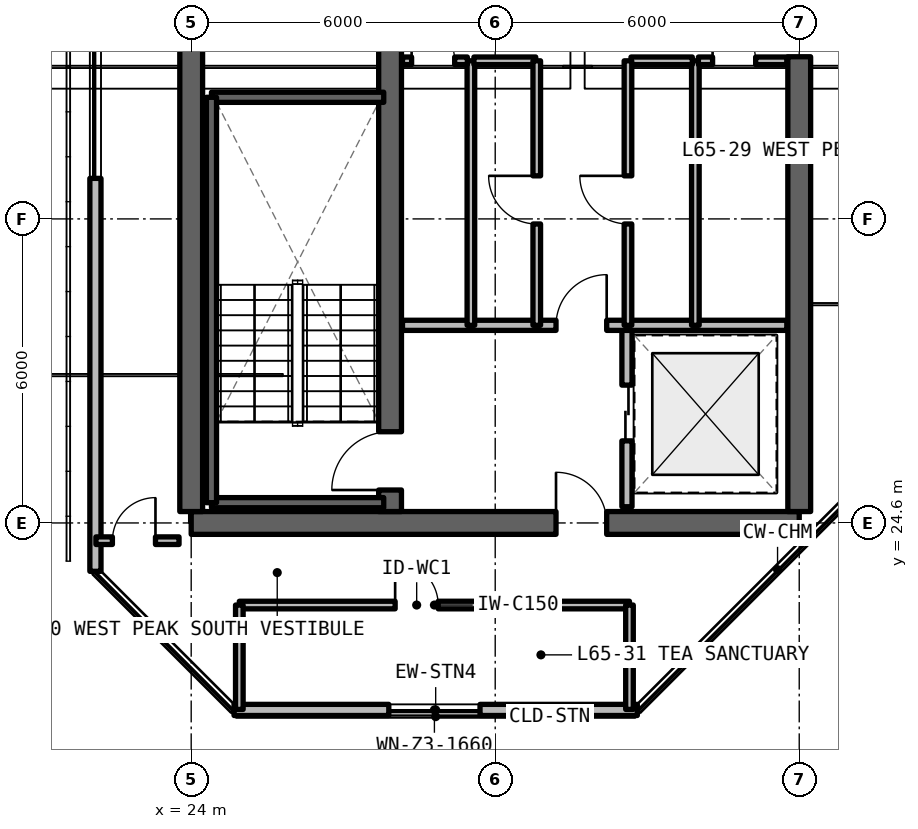
"""IFC4 building model, lengths in metres.
Left out: names, types, materials, properties, quantities, classifications, styles, units other than length and angle.
Written with IfcOpenShell. Run it as: python <this file> out.ifc"""

import sys

from ifc_helpers import new_model, si_unit, direction, frame, frame_2d, origin, place, context, subcontext, project, spatial, rectangle, extrude, element, fill, save


model = new_model("IFC4")
c1 = context("Model", 3, precision=1e-05, world=origin(), true_north=direction((0.0, 1.0)))
c2 = subcontext(c1, "Body", "Model", "MODEL_VIEW")
j1 = project(units=[si_unit("LENGTHUNIT", "METRE"), si_unit("PLANEANGLEUNIT", "RADIAN")], contexts=[c1])
p1 = place(None, origin())
s1 = spatial("IfcSite", under=j1, at=p1, CompositionType="ELEMENT")
p2 = place(p1, origin())
s2 = spatial("IfcBuilding", under=s1, at=p2, CompositionType="ELEMENT")
p3 = place(p2, frame((0.0, 0.0, 232.65)))
s3 = spatial("IfcBuildingStorey", under=s2, at=p3, CompositionType="ELEMENT", Elevation=232.65)
p4 = place(p3, frame((24.0, 24.6, 0.0), z_axis=(0.0, 0.0, 1.0), x_axis=(1.0, 0.0, 0.0)))
e1 = element("IfcWall", 1, at=p4, inside=s3, PredefinedType="SHEAR", context=c2, shape_type="SweptSolid", body=[
    extrude(rectangle(XDim=12.0, YDim=0.45, at=frame_2d((6.0, 0.0))), origin(), (0.0, 0.0, 1.0), 3.3),
])
p5 = place(p4, frame((7.2, 0.0, 0.0)))
e2 = element("IfcOpeningElement", 2, at=p5, cuts=e1, PredefinedType="OPENING", context=c2, shape_type="SweptSolid", body=[
    extrude(rectangle(XDim=1.0, YDim=2.15, at=frame_2d((0.5, 1.075))), frame((0.0, 0.235, 0.0), z_axis=(0.0, -1.0, 0.0), x_axis=(1.0, 0.0, 0.0)), (0.0, 0.0, 1.0), 0.47),
])
p6 = place(p3, frame((24.0, 24.825, 0.0), z_axis=(0.0, 0.0, 1.0), x_axis=(0.0, 1.0, 0.0)))
e3 = element("IfcWall", 3, at=p6, inside=s3, PredefinedType="SHEAR", context=c2, shape_type="SweptSolid", body=[
    extrude(rectangle(XDim=17.55, YDim=0.45, at=frame_2d((8.775, 0.0))), origin(), (0.0, 0.0, 1.0), 3.3),
])
p7 = place(p3, frame((36.0, 24.825, 0.0), z_axis=(0.0, 0.0, 1.0), x_axis=(0.0, 1.0, 0.0)))
e4 = element("IfcWall", 4, at=p7, inside=s3, PredefinedType="SHEAR", context=c2, shape_type="SweptSolid", body=[
    extrude(rectangle(XDim=8.975, YDim=0.45, at=frame_2d((4.488, 0.0))), origin(), (0.0, 0.0, 1.0), 3.3),
])
p8 = place(p3, frame((27.925, 24.825, 0.0), z_axis=(0.0, 0.0, 1.0), x_axis=(0.0, 1.0, 0.0)))
e5 = element("IfcWall", 5, at=p8, inside=s3, PredefinedType="SHEAR", context=c2, shape_type="SweptSolid", body=[
    extrude(rectangle(XDim=17.55, YDim=0.45, at=frame_2d((8.775, 0.0))), origin(), (0.0, 0.0, 1.0), 3.3),
])
p9 = place(p8, frame((0.425, 0.0, 0.0)))
e6 = element("IfcOpeningElement", 6, at=p9, cuts=e5, PredefinedType="OPENING", context=c2, shape_type="SweptSolid", body=[
    extrude(rectangle(XDim=1.15, YDim=2.15, at=frame_2d((0.575, 1.075))), frame((0.0, 0.235, 0.0), z_axis=(0.0, -1.0, 0.0), x_axis=(1.0, 0.0, 0.0)), (0.0, 0.0, 1.0), 0.47),
])
p10 = place(p8, frame((9.625, 0.0, 0.0)))
e7 = element("IfcOpeningElement", 7, at=p10, cuts=e5, PredefinedType="OPENING", context=c2, shape_type="SweptSolid", body=[
    extrude(rectangle(XDim=1.15, YDim=2.15, at=frame_2d((0.575, 1.075))), frame((0.0, 0.235, 0.0), z_axis=(0.0, -1.0, 0.0), x_axis=(1.0, 0.0, 0.0)), (0.0, 0.0, 1.0), 0.47),
])
p11 = place(p3, frame((24.846, 20.91, 0.0), z_axis=(0.0, 0.0, 1.0), x_axis=(1.0, 0.0, 0.0)))
e8 = element("IfcWall", 8, at=p11, inside=s3, PredefinedType="SOLIDWALL", context=c2, shape_type="SweptSolid", body=[
    extrude(rectangle(XDim=7.959, YDim=0.22, at=frame_2d((3.979, 0.0))), origin(), (0.0, 0.0, 1.0), 3.08),
])
p12 = place(p11, frame((3.054, 0.0, 0.78)))
e9 = element("IfcOpeningElement", 9, at=p12, cuts=e8, PredefinedType="OPENING", context=c2, shape_type="SweptSolid", body=[
    extrude(rectangle(XDim=1.8, YDim=1.66, at=frame_2d((0.9, 0.83))), frame((0.0, 0.12, 0.0), z_axis=(0.0, -1.0, 0.0), x_axis=(1.0, 0.0, 0.0)), (0.0, 0.0, 1.0), 0.24),
])
p13 = place(p3, frame((22.11, 43.554, 0.0), z_axis=(0.0, 0.0, 1.0), x_axis=(0.0, -1.0, 0.0)))
e10 = element("IfcWall", 10, at=p13, inside=s3, PredefinedType="SOLIDWALL", context=c2, shape_type="SweptSolid", body=[
    extrude(rectangle(XDim=19.909, YDim=0.22, at=frame_2d((9.955, 0.0))), origin(), (0.0, 0.0, 1.0), 3.08),
])
p14 = place(p13, frame((7.754, 0.0, 0.78)))
e11 = element("IfcOpeningElement", 11, at=p14, cuts=e10, PredefinedType="OPENING", context=c2, shape_type="SweptSolid", body=[
    extrude(rectangle(XDim=4.4, YDim=1.66, at=frame_2d((2.2, 0.83))), frame((0.0, 0.12, 0.0), z_axis=(0.0, -1.0, 0.0), x_axis=(1.0, 0.0, 0.0)), (0.0, 0.0, 1.0), 0.24),
])
p15 = place(p3, frame((32.6, 24.92, 0.0), z_axis=(0.0, 0.0, 1.0), x_axis=(0.0, 1.0, 0.0)))
e12 = element("IfcWall", 12, at=p15, inside=s3, PredefinedType="SOLIDWALL", context=c2, shape_type="SweptSolid", body=[
    extrude(rectangle(XDim=3.58, YDim=0.2, at=frame_2d((1.79, 0.0))), origin(), (0.0, 0.0, 1.0), 2.35),
])
p16 = place(p15, frame((1.3, 0.0, 0.0)))
e13 = element("IfcOpeningElement", 13, at=p16, cuts=e12, PredefinedType="OPENING", context=c2, shape_type="SweptSolid", body=[
    extrude(rectangle(XDim=1.1, YDim=2.2, at=frame_2d((0.55, 1.1))), frame((0.0, 0.11, 0.0), z_axis=(0.0, -1.0, 0.0), x_axis=(1.0, 0.0, 0.0)), (0.0, 0.0, 1.0), 0.22),
])
p17 = place(p3, frame((28.17, 28.5, 0.0), z_axis=(0.0, 0.0, 1.0), x_axis=(1.0, 0.0, 0.0)))
e14 = element("IfcWall", 14, at=p17, inside=s3, PredefinedType="SOLIDWALL", context=c2, shape_type="SweptSolid", body=[
    extrude(rectangle(XDim=7.585, YDim=0.2, at=frame_2d((3.792, 0.0))), origin(), (0.0, 0.0, 1.0), 2.35),
])
p18 = place(p17, frame((3.03, 0.0, 0.0)))
e15 = element("IfcOpeningElement", 15, at=p18, cuts=e14, PredefinedType="OPENING", context=c2, shape_type="SweptSolid", body=[
    extrude(rectangle(XDim=1.0, YDim=2.15, at=frame_2d((0.5, 1.075))), frame((0.0, 0.11, 0.0), z_axis=(0.0, -1.0, 0.0), x_axis=(1.0, 0.0, 0.0)), (0.0, 0.0, 1.0), 0.22),
])
p19 = place(p3, frame((29.52, 28.5, 0.0), z_axis=(0.0, 0.0, 1.0), x_axis=(0.0, 1.0, 0.0)))
e16 = element("IfcWall", 16, at=p19, inside=s3, PredefinedType="SOLIDWALL", context=c2, shape_type="SweptSolid", body=[
    extrude(rectangle(XDim=5.22, YDim=0.15, at=frame_2d((2.61, 0.0))), origin(), (0.0, 0.0, 1.0), 2.35),
])
p20 = place(p3, frame((28.17, 33.72, 0.0), z_axis=(0.0, 0.0, 1.0), x_axis=(1.0, 0.0, 0.0)))
e17 = element("IfcWall", 17, at=p20, inside=s3, PredefinedType="SOLIDWALL", context=c2, shape_type="SweptSolid", body=[
    extrude(rectangle(XDim=1.28, YDim=0.15, at=frame_2d((0.64, 0.0))), origin(), (0.0, 0.0, 1.0), 2.35),
])
p21 = place(p20, frame((0.18, 0.0, 0.0)))
e18 = element("IfcOpeningElement", 18, at=p21, cuts=e17, PredefinedType="OPENING", context=c2, shape_type="SweptSolid", body=[
    extrude(rectangle(XDim=0.85, YDim=2.1, at=frame_2d((0.425, 1.05))), frame((0.0, 0.085, 0.0), z_axis=(0.0, -1.0, 0.0), x_axis=(1.0, 0.0, 0.0)), (0.0, 0.0, 1.0), 0.17),
])
p22 = place(p3, frame((29.58, 33.72, 0.0), z_axis=(0.0, 0.0, 1.0), x_axis=(1.0, 0.0, 0.0)))
e19 = element("IfcWall", 19, at=p22, inside=s3, PredefinedType="SOLIDWALL", context=c2, shape_type="SweptSolid", body=[
    extrude(rectangle(XDim=1.22, YDim=0.15, at=frame_2d((0.61, 0.0))), origin(), (0.0, 0.0, 1.0), 2.35),
])
p23 = place(p3, frame((30.82, 28.5, 0.0), z_axis=(0.0, 0.0, 1.0), x_axis=(0.0, 1.0, 0.0)))
e20 = element("IfcWall", 20, at=p23, inside=s3, PredefinedType="SOLIDWALL", context=c2, shape_type="SweptSolid", body=[
    extrude(rectangle(XDim=5.22, YDim=0.15, at=frame_2d((2.61, 0.0))), origin(), (0.0, 0.0, 1.0), 2.35),
])
p24 = place(p23, frame((2.0, 0.0, 0.0)))
e21 = element("IfcOpeningElement", 21, at=p24, cuts=e20, PredefinedType="OPENING", context=c2, shape_type="SweptSolid", body=[
    extrude(rectangle(XDim=0.95, YDim=2.15, at=frame_2d((0.475, 1.075))), frame((0.0, 0.085, 0.0), z_axis=(0.0, -1.0, 0.0), x_axis=(1.0, 0.0, 0.0)), (0.0, 0.0, 1.0), 0.17),
])
p25 = place(p3, frame((33.95, 28.5, 0.0), z_axis=(0.0, 0.0, 1.0), x_axis=(0.0, 1.0, 0.0)))
e22 = element("IfcWall", 22, at=p25, inside=s3, PredefinedType="SOLIDWALL", context=c2, shape_type="SweptSolid", body=[
    extrude(rectangle(XDim=5.22, YDim=0.15, at=frame_2d((2.61, 0.0))), origin(), (0.0, 0.0, 1.0), 2.35),
])
p26 = place(p3, frame((32.68, 33.72, 0.0), z_axis=(0.0, 0.0, 1.0), x_axis=(1.0, 0.0, 0.0)))
e23 = element("IfcWall", 23, at=p26, inside=s3, PredefinedType="SOLIDWALL", context=c2, shape_type="SweptSolid", body=[
    extrude(rectangle(XDim=1.21, YDim=0.15, at=frame_2d((0.605, 0.0))), origin(), (0.0, 0.0, 1.0), 2.35),
])
p27 = place(p3, frame((34.01, 33.72, 0.0), z_axis=(0.0, 0.0, 1.0), x_axis=(1.0, 0.0, 0.0)))
e24 = element("IfcWall", 24, at=p27, inside=s3, PredefinedType="SOLIDWALL", context=c2, shape_type="SweptSolid", body=[
    extrude(rectangle(XDim=1.745, YDim=0.15, at=frame_2d((0.873, 0.0))), origin(), (0.0, 0.0, 1.0), 2.35),
])
p28 = place(p27, frame((0.28, 0.0, 0.0)))
e25 = element("IfcOpeningElement", 25, at=p28, cuts=e24, PredefinedType="OPENING", context=c2, shape_type="SweptSolid", body=[
    extrude(rectangle(XDim=0.85, YDim=2.1, at=frame_2d((0.425, 1.05))), frame((0.0, 0.085, 0.0), z_axis=(0.0, -1.0, 0.0), x_axis=(1.0, 0.0, 0.0)), (0.0, 0.0, 1.0), 0.17),
])
p29 = place(p3, frame((32.62, 28.5, 0.0), z_axis=(0.0, 0.0, 1.0), x_axis=(0.0, 1.0, 0.0)))
e26 = element("IfcWall", 26, at=p29, inside=s3, PredefinedType="SOLIDWALL", context=c2, shape_type="SweptSolid", body=[
    extrude(rectangle(XDim=5.22, YDim=0.15, at=frame_2d((2.61, 0.0))), origin(), (0.0, 0.0, 1.0), 2.35),
])
p30 = place(p29, frame((2.0, 0.0, 0.0)))
e27 = element("IfcOpeningElement", 27, at=p30, cuts=e26, PredefinedType="OPENING", context=c2, shape_type="SweptSolid", body=[
    extrude(rectangle(XDim=0.95, YDim=2.15, at=frame_2d((0.475, 1.075))), frame((0.0, 0.085, 0.0), z_axis=(0.0, -1.0, 0.0), x_axis=(1.0, 0.0, 0.0)), (0.0, 0.0, 1.0), 0.17),
])
p31 = place(p3, frame((24.95, 22.98, 0.0), z_axis=(0.0, 0.0, 1.0), x_axis=(1.0, 0.0, 0.0)))
e28 = element("IfcWall", 28, at=p31, inside=s3, PredefinedType="SOLIDWALL", context=c2, shape_type="SweptSolid", body=[
    extrude(rectangle(XDim=7.7, YDim=0.15, at=frame_2d((3.85, 0.0))), origin(), (0.0, 0.0, 1.0), 2.35),
])
p32 = place(p31, frame((3.075, 0.0, 0.0)))
e29 = element("IfcOpeningElement", 29, at=p32, cuts=e28, PredefinedType="OPENING", context=c2, shape_type="SweptSolid", body=[
    extrude(rectangle(XDim=0.85, YDim=2.1, at=frame_2d((0.425, 1.05))), frame((0.0, 0.085, 0.0), z_axis=(0.0, -1.0, 0.0), x_axis=(1.0, 0.0, 0.0)), (0.0, 0.0, 1.0), 0.17),
])
for number, where, z_axis, x_axis in (
    (30, (24.95, 20.92, 0.0), (0.0, 0.0, 1.0), (0.0, 1.0, 0.0)),
    (31, (32.65, 20.92, 0.0), (0.0, 0.0, 1.0), (0.0, 1.0, 0.0)),
):
    element("IfcWall", number, at=place(p3, frame(where, z_axis=z_axis, x_axis=x_axis)), inside=s3, PredefinedType="SOLIDWALL", context=c2, shape_type="SweptSolid", body=[
        extrude(rectangle(XDim=2.06, YDim=0.15, at=frame_2d((1.03, 0.0))), origin(), (0.0, 0.0, 1.0), 2.35),
    ])
p33 = place(p3, frame((22.12, 24.25, 0.0), z_axis=(0.0, 0.0, 1.0), x_axis=(1.0, 0.0, 0.0)))
e32 = element("IfcWall", 32, at=p33, inside=s3, PredefinedType="SOLIDWALL", context=c2, shape_type="SweptSolid", body=[
    extrude(rectangle(XDim=1.64, YDim=0.15, at=frame_2d((0.82, 0.0))), origin(), (0.0, 0.0, 1.0), 2.35),
])
p34 = place(p33, frame((0.325, 0.0, 0.0)))
e33 = element("IfcOpeningElement", 33, at=p34, cuts=e32, PredefinedType="OPENING", context=c2, shape_type="SweptSolid", body=[
    extrude(rectangle(XDim=0.85, YDim=2.1, at=frame_2d((0.425, 1.05))), frame((0.0, 0.085, 0.0), z_axis=(0.0, -1.0, 0.0), x_axis=(1.0, 0.0, 0.0)), (0.0, 0.0, 1.0), 0.17),
])
for number, where, z_axis, x_axis in (
    (34, (24.4, 25.0, 0.0), (0.0, 0.0, 1.0), (1.0, 0.0, 0.0)),
    (35, (27.8, 33.0, 0.0), (0.0, 0.0, 1.0), (-1.0, 0.0, 0.0)),
):
    element("IfcWall", number, at=place(p3, frame(where, z_axis=z_axis, x_axis=x_axis)), inside=s3, PredefinedType="SOLIDWALL", context=c2, shape_type="SweptSolid", body=[
        extrude(rectangle(XDim=3.4, YDim=0.2, at=frame_2d((1.7, 0.0))), origin(), (0.0, 0.0, 1.0), 3.3),
    ])
p35 = place(p3, frame((24.4, 33.0, 0.0), z_axis=(0.0, 0.0, 1.0), x_axis=(0.0, -1.0, 0.0)))
e36 = element("IfcWall", 36, at=p35, inside=s3, PredefinedType="SOLIDWALL", context=c2, shape_type="SweptSolid", body=[
    extrude(rectangle(XDim=8.0, YDim=0.2, at=frame_2d((4.0, 0.0))), origin(), (0.0, 0.0, 1.0), 3.3),
])
p36 = place(p12, origin())
e37 = element("IfcWindow", 37, at=p36, inside=s3, PartitioningType="SINGLE_PANEL", PredefinedType="WINDOW", context=c2, shape_type="SweptSolid", body=[
    extrude(rectangle(XDim=1.8, YDim=1.66, at=frame_2d((0.9, 0.83))), frame((0.0, 0.03, 0.0), z_axis=(0.0, -1.0, 0.0), x_axis=(1.0, 0.0, 0.0)), (0.0, 0.0, 1.0), 0.06),
])
fill(e9, e37)
p37 = place(p14, origin())
e38 = element("IfcWindow", 38, at=p37, inside=s3, PartitioningType="SINGLE_PANEL", PredefinedType="WINDOW", context=c2, shape_type="SweptSolid", body=[
    extrude(rectangle(XDim=4.4, YDim=1.66, at=frame_2d((2.2, 0.83))), frame((0.0, 0.03, 0.0), z_axis=(0.0, -1.0, 0.0), x_axis=(1.0, 0.0, 0.0)), (0.0, 0.0, 1.0), 0.06),
])
fill(e11, e38)
p38 = place(p16, origin())
e39 = element("IfcDoor", 39, at=p38, inside=s3, OperationType="SLIDING_TO_LEFT", PredefinedType="DOOR", context=c2, shape_type="SweptSolid", body=[
    extrude(rectangle(XDim=1.1, YDim=2.2, at=frame_2d((0.55, 1.1))), frame((0.0, 0.025, 0.0), z_axis=(0.0, -1.0, 0.0), x_axis=(1.0, 0.0, 0.0)), (0.0, 0.0, 1.0), 0.05),
])
fill(e13, e39)
p39 = place(p18, origin())
e40 = element("IfcDoor", 40, at=p39, inside=s3, OperationType="SINGLE_SWING_RIGHT", PredefinedType="DOOR", context=c2, shape_type="SweptSolid", body=[
    extrude(rectangle(XDim=1.0, YDim=2.15, at=frame_2d((0.5, 1.075))), frame((0.0, 0.025, 0.0), z_axis=(0.0, -1.0, 0.0), x_axis=(1.0, 0.0, 0.0)), (0.0, 0.0, 1.0), 0.05),
])
fill(e15, e40)
p40 = place(p21, origin())
e41 = element("IfcDoor", 41, at=p40, inside=s3, OperationType="SINGLE_SWING_LEFT", PredefinedType="DOOR", context=c2, shape_type="SweptSolid", body=[
    extrude(rectangle(XDim=0.85, YDim=2.1, at=frame_2d((0.425, 1.05))), frame((0.0, 0.025, 0.0), z_axis=(0.0, -1.0, 0.0), x_axis=(1.0, 0.0, 0.0)), (0.0, 0.0, 1.0), 0.05),
])
fill(e18, e41)
p41 = place(p24, origin())
e42 = element("IfcDoor", 42, at=p41, inside=s3, OperationType="SINGLE_SWING_RIGHT", PredefinedType="DOOR", context=c2, shape_type="SweptSolid", body=[
    extrude(rectangle(XDim=0.95, YDim=2.15, at=frame_2d((0.475, 1.075))), frame((0.0, 0.025, 0.0), z_axis=(0.0, -1.0, 0.0), x_axis=(1.0, 0.0, 0.0)), (0.0, 0.0, 1.0), 0.05),
])
fill(e21, e42)
p42 = place(p28, origin())
e43 = element("IfcDoor", 43, at=p42, inside=s3, OperationType="SINGLE_SWING_LEFT", PredefinedType="DOOR", context=c2, shape_type="SweptSolid", body=[
    extrude(rectangle(XDim=0.85, YDim=2.1, at=frame_2d((0.425, 1.05))), frame((0.0, 0.025, 0.0), z_axis=(0.0, -1.0, 0.0), x_axis=(1.0, 0.0, 0.0)), (0.0, 0.0, 1.0), 0.05),
])
fill(e25, e43)
p43 = place(p30, origin())
e44 = element("IfcDoor", 44, at=p43, inside=s3, OperationType="SINGLE_SWING_RIGHT", PredefinedType="DOOR", context=c2, shape_type="SweptSolid", body=[
    extrude(rectangle(XDim=0.95, YDim=2.15, at=frame_2d((0.475, 1.075))), frame((0.0, 0.025, 0.0), z_axis=(0.0, -1.0, 0.0), x_axis=(1.0, 0.0, 0.0)), (0.0, 0.0, 1.0), 0.05),
])
fill(e27, e44)
p44 = place(p32, origin())
e45 = element("IfcDoor", 45, at=p44, inside=s3, OperationType="SINGLE_SWING_LEFT", PredefinedType="DOOR", context=c2, shape_type="SweptSolid", body=[
    extrude(rectangle(XDim=0.85, YDim=2.1, at=frame_2d((0.425, 1.05))), frame((0.0, 0.025, 0.0), z_axis=(0.0, -1.0, 0.0), x_axis=(1.0, 0.0, 0.0)), (0.0, 0.0, 1.0), 0.05),
])
fill(e29, e45)
p45 = place(p34, origin())
e46 = element("IfcDoor", 46, at=p45, inside=s3, OperationType="SINGLE_SWING_RIGHT", PredefinedType="DOOR", context=c2, shape_type="SweptSolid", body=[
    extrude(rectangle(XDim=0.85, YDim=2.1, at=frame_2d((0.425, 1.05))), frame((0.0, 0.025, 0.0), z_axis=(0.0, -1.0, 0.0), x_axis=(1.0, 0.0, 0.0)), (0.0, 0.0, 1.0), 0.05),
])
fill(e33, e46)
p46 = place(p9, origin())
e47 = element("IfcDoor", 47, at=p46, inside=s3, OperationType="SINGLE_SWING_RIGHT", PredefinedType="DOOR", context=c2, shape_type="SweptSolid", body=[
    extrude(rectangle(XDim=1.15, YDim=2.15, at=frame_2d((0.575, 1.075))), frame((0.0, 0.025, 0.0), z_axis=(0.0, -1.0, 0.0), x_axis=(1.0, 0.0, 0.0)), (0.0, 0.0, 1.0), 0.05),
])
fill(e6, e47)
p47 = place(p5, origin())
e48 = element("IfcDoor", 48, at=p47, inside=s3, OperationType="SINGLE_SWING_LEFT", PredefinedType="DOOR", context=c2, shape_type="SweptSolid", body=[
    extrude(rectangle(XDim=1.0, YDim=2.15, at=frame_2d((0.5, 1.075))), frame((0.0, 0.025, 0.0), z_axis=(0.0, -1.0, 0.0), x_axis=(1.0, 0.0, 0.0)), (0.0, 0.0, 1.0), 0.05),
])
fill(e2, e48)
save(model, sys.argv[1])
